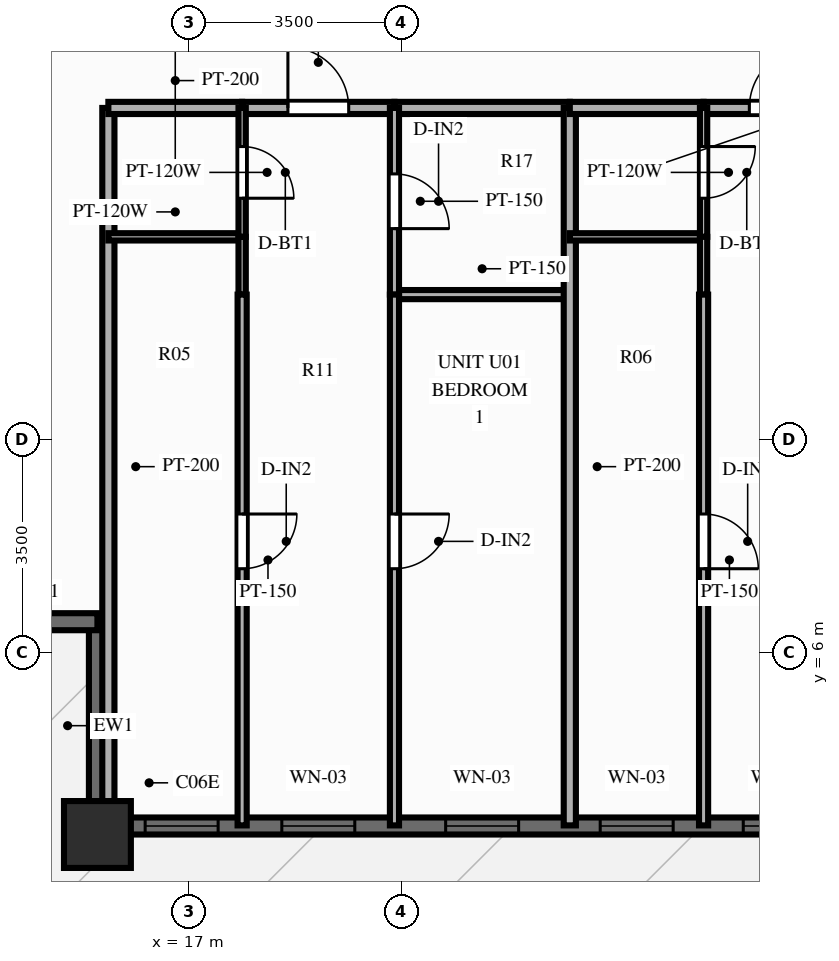
"""IFC4 building model, lengths in metres.
Left out: names, types, materials, properties, quantities, classifications, styles, units other than length and angle.
Written with IfcOpenShell. Run it as: python <this file> out.ifc"""

import sys

from ifc_helpers import new_model, si_unit, direction, frame, frame_2d, origin, origin_2d, place, context, subcontext, project, spatial, rectangle, extrude, source, transform, mapped, element, fill, save


model = new_model("IFC4")
c1 = context("Model", 3, precision=1e-05, world=origin(), true_north=direction((0.0, 1.0)))
c2 = subcontext(c1, "Body", "Model", "MODEL_VIEW")
j1 = project(units=[si_unit("LENGTHUNIT", "METRE"), si_unit("PLANEANGLEUNIT", "RADIAN")], contexts=[c1])
p1 = place(None, origin())
s1 = spatial("IfcSite", under=j1, at=p1, CompositionType="ELEMENT")
p2 = place(p1, origin())
s2 = spatial("IfcBuilding", under=s1, at=p2, CompositionType="ELEMENT")
p3 = place(p2, frame((0.0, 0.0, 19.4)))
s3 = spatial("IfcBuildingStorey", under=s2, at=p3, CompositionType="ELEMENT", Elevation=19.4)
m1 = source(origin(), c2, "Body", "SweptSolid", [
    extrude(rectangle(XDim=1.1, YDim=1.1, at=origin_2d()), origin(), (0.0, 0.0, 1.0), 3.0),
])
p4 = place(p3, frame((15.5, 3.0, 0.0), z_axis=(0.0, 0.0, 1.0), x_axis=(1.0, 0.0, 0.0)))
e1 = element("IfcColumn", 1, at=p4, inside=s3, PredefinedType="COLUMN", context=c2, shape_type="MappedRepresentation", body=[
    mapped(m1, transform((0.0, 0.0, 0.0), scale=1.0)),
])
p5 = place(p3, frame((15.5, 3.14, 0.0), z_axis=(0.0, 0.0, 1.0), x_axis=(1.0, 0.0, 0.0)))
e2 = element("IfcWall", 2, at=p5, inside=s3, PredefinedType="SOLIDWALL", context=c2, shape_type="SweptSolid", body=[
    extrude(rectangle(XDim=45.0, YDim=0.28, at=frame_2d((22.5, 0.0))), origin(), (0.0, 0.0, 1.0), 2.28),
])
p6 = place(p5, frame((0.785, 0.0, 0.25)))
e3 = element("IfcOpeningElement", 3, at=p6, cuts=e2, PredefinedType="OPENING", context=c2, shape_type="SweptSolid", body=[
    extrude(rectangle(XDim=1.2, YDim=1.5, at=frame_2d((0.6, 0.75))), frame((0.0, 0.152, 0.0), z_axis=(0.0, -1.0, 0.0), x_axis=(1.0, 0.0, 0.0)), (0.0, 0.0, 1.0), 0.304),
])
p7 = place(p5, frame((3.033, 0.0, 0.25)))
e4 = element("IfcOpeningElement", 4, at=p7, cuts=e2, PredefinedType="OPENING", context=c2, shape_type="SweptSolid", body=[
    extrude(rectangle(XDim=1.2, YDim=1.5, at=frame_2d((0.6, 0.75))), frame((0.0, 0.152, 0.0), z_axis=(0.0, -1.0, 0.0), x_axis=(1.0, 0.0, 0.0)), (0.0, 0.0, 1.0), 0.304),
])
p8 = place(p5, frame((5.727, 0.0, 0.25)))
e5 = element("IfcOpeningElement", 5, at=p8, cuts=e2, PredefinedType="OPENING", context=c2, shape_type="SweptSolid", body=[
    extrude(rectangle(XDim=1.2, YDim=1.5, at=frame_2d((0.6, 0.75))), frame((0.0, 0.152, 0.0), z_axis=(0.0, -1.0, 0.0), x_axis=(1.0, 0.0, 0.0)), (0.0, 0.0, 1.0), 0.304),
])
p9 = place(p5, frame((8.269, 0.0, 0.25)))
e6 = element("IfcOpeningElement", 6, at=p9, cuts=e2, PredefinedType="OPENING", context=c2, shape_type="SweptSolid", body=[
    extrude(rectangle(XDim=1.2, YDim=1.5, at=frame_2d((0.6, 0.75))), frame((0.0, 0.152, 0.0), z_axis=(0.0, -1.0, 0.0), x_axis=(1.0, 0.0, 0.0)), (0.0, 0.0, 1.0), 0.304),
])
p10 = place(p5, frame((10.621, 0.0, 0.25)))
e7 = element("IfcOpeningElement", 7, at=p10, cuts=e2, PredefinedType="OPENING", context=c2, shape_type="SweptSolid", body=[
    extrude(rectangle(XDim=1.2, YDim=1.5, at=frame_2d((0.6, 0.75))), frame((0.0, 0.152, 0.0), z_axis=(0.0, -1.0, 0.0), x_axis=(1.0, 0.0, 0.0)), (0.0, 0.0, 1.0), 0.304),
])
p11 = place(p5, frame((13.316, 0.0, 0.25)))
e8 = element("IfcOpeningElement", 8, at=p11, cuts=e2, PredefinedType="OPENING", context=c2, shape_type="SweptSolid", body=[
    extrude(rectangle(XDim=1.2, YDim=1.5, at=frame_2d((0.6, 0.75))), frame((0.0, 0.152, 0.0), z_axis=(0.0, -1.0, 0.0), x_axis=(1.0, 0.0, 0.0)), (0.0, 0.0, 1.0), 0.304),
])
p12 = place(p5, frame((16.624, 0.0, 0.25)))
e9 = element("IfcOpeningElement", 9, at=p12, cuts=e2, PredefinedType="OPENING", context=c2, shape_type="SweptSolid", body=[
    extrude(rectangle(XDim=0.7, YDim=1.5, at=frame_2d((0.35, 0.75))), frame((0.0, 0.152, 0.0), z_axis=(0.0, -1.0, 0.0), x_axis=(1.0, 0.0, 0.0)), (0.0, 0.0, 1.0), 0.304),
])
p13 = place(p5, frame((18.141, 0.0, 0.25)))
e10 = element("IfcOpeningElement", 10, at=p13, cuts=e2, PredefinedType="OPENING", context=c2, shape_type="SweptSolid", body=[
    extrude(rectangle(XDim=1.2, YDim=1.5, at=frame_2d((0.6, 0.75))), frame((0.0, 0.152, 0.0), z_axis=(0.0, -1.0, 0.0), x_axis=(1.0, 0.0, 0.0)), (0.0, 0.0, 1.0), 0.304),
])
p14 = place(p5, frame((21.874, 0.0, 0.0), z_axis=(0.0, 0.0, 1.0), x_axis=(-1.0, 0.0, 0.0)))
e11 = element("IfcOpeningElement", 11, at=p14, cuts=e2, PredefinedType="OPENING", context=c2, shape_type="SweptSolid", body=[
    extrude(rectangle(XDim=1.1, YDim=2.15, at=frame_2d((0.55, 1.075))), frame((0.0, 0.152, 0.0), z_axis=(0.0, -1.0, 0.0), x_axis=(1.0, 0.0, 0.0)), (0.0, 0.0, 1.0), 0.304),
])
p15 = place(p5, frame((23.223, 0.0, 0.25)))
e12 = element("IfcOpeningElement", 12, at=p15, cuts=e2, PredefinedType="OPENING", context=c2, shape_type="SweptSolid", body=[
    extrude(rectangle(XDim=1.2, YDim=1.5, at=frame_2d((0.6, 0.75))), frame((0.0, 0.152, 0.0), z_axis=(0.0, -1.0, 0.0), x_axis=(1.0, 0.0, 0.0)), (0.0, 0.0, 1.0), 0.304),
])
p16 = place(p5, frame((25.507, 0.0, 0.25)))
e13 = element("IfcOpeningElement", 13, at=p16, cuts=e2, PredefinedType="OPENING", context=c2, shape_type="SweptSolid", body=[
    extrude(rectangle(XDim=1.2, YDim=1.5, at=frame_2d((0.6, 0.75))), frame((0.0, 0.152, 0.0), z_axis=(0.0, -1.0, 0.0), x_axis=(1.0, 0.0, 0.0)), (0.0, 0.0, 1.0), 0.304),
])
p17 = place(p5, frame((27.6, 0.0, 0.25)))
e14 = element("IfcOpeningElement", 14, at=p17, cuts=e2, PredefinedType="OPENING", context=c2, shape_type="SweptSolid", body=[
    extrude(rectangle(XDim=0.7, YDim=1.5, at=frame_2d((0.35, 0.75))), frame((0.0, 0.152, 0.0), z_axis=(0.0, -1.0, 0.0), x_axis=(1.0, 0.0, 0.0)), (0.0, 0.0, 1.0), 0.304),
])
p18 = place(p5, frame((30.589, 0.0, 0.25)))
e15 = element("IfcOpeningElement", 15, at=p18, cuts=e2, PredefinedType="OPENING", context=c2, shape_type="SweptSolid", body=[
    extrude(rectangle(XDim=1.2, YDim=1.5, at=frame_2d((0.6, 0.75))), frame((0.0, 0.152, 0.0), z_axis=(0.0, -1.0, 0.0), x_axis=(1.0, 0.0, 0.0)), (0.0, 0.0, 1.0), 0.304),
])
p19 = place(p5, frame((32.872, 0.0, 0.25)))
e16 = element("IfcOpeningElement", 16, at=p19, cuts=e2, PredefinedType="OPENING", context=c2, shape_type="SweptSolid", body=[
    extrude(rectangle(XDim=1.2, YDim=1.5, at=frame_2d((0.6, 0.75))), frame((0.0, 0.152, 0.0), z_axis=(0.0, -1.0, 0.0), x_axis=(1.0, 0.0, 0.0)), (0.0, 0.0, 1.0), 0.304),
])
p20 = place(p5, frame((35.455, 0.0, 0.25)))
e17 = element("IfcOpeningElement", 17, at=p20, cuts=e2, PredefinedType="OPENING", context=c2, shape_type="SweptSolid", body=[
    extrude(rectangle(XDim=1.2, YDim=1.5, at=frame_2d((0.6, 0.75))), frame((0.0, 0.152, 0.0), z_axis=(0.0, -1.0, 0.0), x_axis=(1.0, 0.0, 0.0)), (0.0, 0.0, 1.0), 0.304),
])
p21 = place(p5, frame((37.954, 0.0, 0.25)))
e18 = element("IfcOpeningElement", 18, at=p21, cuts=e2, PredefinedType="OPENING", context=c2, shape_type="SweptSolid", body=[
    extrude(rectangle(XDim=1.2, YDim=1.5, at=frame_2d((0.6, 0.75))), frame((0.0, 0.152, 0.0), z_axis=(0.0, -1.0, 0.0), x_axis=(1.0, 0.0, 0.0)), (0.0, 0.0, 1.0), 0.304),
])
p22 = place(p5, frame((40.238, 0.0, 0.25)))
e19 = element("IfcOpeningElement", 19, at=p22, cuts=e2, PredefinedType="OPENING", context=c2, shape_type="SweptSolid", body=[
    extrude(rectangle(XDim=1.2, YDim=1.5, at=frame_2d((0.6, 0.75))), frame((0.0, 0.152, 0.0), z_axis=(0.0, -1.0, 0.0), x_axis=(1.0, 0.0, 0.0)), (0.0, 0.0, 1.0), 0.304),
])
p23 = place(p5, frame((42.716, 0.0, 0.25)))
e20 = element("IfcOpeningElement", 20, at=p23, cuts=e2, PredefinedType="OPENING", context=c2, shape_type="SweptSolid", body=[
    extrude(rectangle(XDim=1.2, YDim=1.5, at=frame_2d((0.6, 0.75))), frame((0.0, 0.152, 0.0), z_axis=(0.0, -1.0, 0.0), x_axis=(1.0, 0.0, 0.0)), (0.0, 0.0, 1.0), 0.304),
])
for number, where, z_axis, x_axis in (
    (21, (15.5, 3.08, 0.0), (0.0, 0.0, 1.0), (0.0, 1.0, 0.0)),
    (22, (12.08, 6.5, 0.0), (0.0, 0.0, 1.0), (1.0, 0.0, 0.0)),
):
    element("IfcWall", number, at=place(p3, frame(where, z_axis=z_axis, x_axis=x_axis)), inside=s3, PredefinedType="SOLIDWALL", context=c2, shape_type="SweptSolid", body=[
        extrude(rectangle(XDim=3.42, YDim=0.28, at=frame_2d((1.71, 0.0))), origin(), (0.0, 0.0, 1.0), 2.28),
    ])
p24 = place(p3, frame((15.68, 14.95, 0.0), z_axis=(0.0, 0.0, 1.0), x_axis=(0.0, -1.0, 0.0)))
e23 = element("IfcWall", 23, at=p24, inside=s3, PredefinedType="PARTITIONING", context=c2, shape_type="SweptSolid", body=[
    extrude(rectangle(XDim=11.8, YDim=0.2, at=frame_2d((5.9, 0.0))), origin(), (0.0, 0.0, 1.0), 2.79),
])
p25 = place(p3, frame((15.68, 14.95, 0.0), z_axis=(0.0, 0.0, 1.0), x_axis=(1.0, 0.0, 0.0)))
e24 = element("IfcWall", 24, at=p25, inside=s3, PredefinedType="PARTITIONING", context=c2, shape_type="SweptSolid", body=[
    extrude(rectangle(XDim=2.2, YDim=0.2, at=frame_2d((1.1, 0.0))), origin(), (0.0, 0.0, 1.0), 2.79),
])
p26 = place(p3, frame((17.88, 14.95, 0.0), z_axis=(0.0, 0.0, 1.0), x_axis=(1.0, 0.0, 0.0)))
e25 = element("IfcWall", 25, at=p26, inside=s3, PredefinedType="PARTITIONING", context=c2, shape_type="SweptSolid", body=[
    extrude(rectangle(XDim=2.505, YDim=0.2, at=frame_2d((1.252, 0.0))), origin(), (0.0, 0.0, 1.0), 2.79),
])
p27 = place(p26, frame((0.753, 0.0, 0.0)))
e26 = element("IfcOpeningElement", 26, at=p27, cuts=e25, PredefinedType="OPENING", context=c2, shape_type="SweptSolid", body=[
    extrude(rectangle(XDim=1.0, YDim=2.15, at=frame_2d((0.5, 1.075))), frame((0.0, 0.112, 0.0), z_axis=(0.0, -1.0, 0.0), x_axis=(1.0, 0.0, 0.0)), (0.0, 0.0, 1.0), 0.224),
])
p28 = place(p3, frame((20.385, 14.95, 0.0), z_axis=(0.0, 0.0, 1.0), x_axis=(1.0, 0.0, 0.0)))
e27 = element("IfcWall", 27, at=p28, inside=s3, PredefinedType="PARTITIONING", context=c2, shape_type="SweptSolid", body=[
    extrude(rectangle(XDim=2.884, YDim=0.2, at=frame_2d((1.442, 0.0))), origin(), (0.0, 0.0, 1.0), 2.79),
])
p29 = place(p3, frame((15.68, 12.83, 0.0), z_axis=(0.0, 0.0, 1.0), x_axis=(1.0, 0.0, 0.0)))
e28 = element("IfcWall", 28, at=p29, inside=s3, PredefinedType="PARTITIONING", context=c2, shape_type="SweptSolid", body=[
    extrude(rectangle(XDim=2.2, YDim=0.12, at=frame_2d((1.1, 0.0))), origin(), (0.0, 0.0, 1.0), 2.79),
])
p30 = place(p3, frame((20.385, 11.88, 0.0), z_axis=(0.0, 0.0, 1.0), x_axis=(1.0, 0.0, 0.0)))
e29 = element("IfcWall", 29, at=p30, inside=s3, PredefinedType="PARTITIONING", context=c2, shape_type="SweptSolid", body=[
    extrude(rectangle(XDim=2.884, YDim=0.15, at=frame_2d((1.442, 0.0))), origin(), (0.0, 0.0, 1.0), 2.79),
])
p31 = place(p3, frame((17.88, 14.95, 0.0), z_axis=(0.0, 0.0, 1.0), x_axis=(0.0, -1.0, 0.0)))
e30 = element("IfcWall", 30, at=p31, inside=s3, PredefinedType="PARTITIONING", context=c2, shape_type="SweptSolid", body=[
    extrude(rectangle(XDim=2.12, YDim=0.12, at=frame_2d((1.06, 0.0))), origin(), (0.0, 0.0, 1.0), 2.79),
])
p32 = place(p31, frame((0.635, 0.0, 0.0)))
e31 = element("IfcOpeningElement", 31, at=p32, cuts=e30, PredefinedType="OPENING", context=c2, shape_type="SweptSolid", body=[
    extrude(rectangle(XDim=0.85, YDim=2.05, at=frame_2d((0.425, 1.025))), frame((0.0, 0.072, 0.0), z_axis=(0.0, -1.0, 0.0), x_axis=(1.0, 0.0, 0.0)), (0.0, 0.0, 1.0), 0.144),
])
p33 = place(p3, frame((17.88, 12.83, 0.0), z_axis=(0.0, 0.0, 1.0), x_axis=(0.0, -1.0, 0.0)))
e32 = element("IfcWall", 32, at=p33, inside=s3, PredefinedType="PARTITIONING", context=c2, shape_type="SweptSolid", body=[
    extrude(rectangle(XDim=0.95, YDim=0.12, at=frame_2d((0.475, 0.0))), origin(), (0.0, 0.0, 1.0), 2.79),
])
p34 = place(p3, frame((17.88, 11.88, 0.0), z_axis=(0.0, 0.0, 1.0), x_axis=(0.0, -1.0, 0.0)))
e33 = element("IfcWall", 33, at=p34, inside=s3, PredefinedType="PARTITIONING", context=c2, shape_type="SweptSolid", body=[
    extrude(rectangle(XDim=8.73, YDim=0.15, at=frame_2d((4.365, 0.0))), origin(), (0.0, 0.0, 1.0), 2.79),
])
p35 = place(p34, frame((3.609, 0.0, 0.0)))
e34 = element("IfcOpeningElement", 34, at=p35, cuts=e33, PredefinedType="OPENING", context=c2, shape_type="SweptSolid", body=[
    extrude(rectangle(XDim=0.9, YDim=2.1, at=frame_2d((0.45, 1.05))), frame((0.0, 0.087, 0.0), z_axis=(0.0, -1.0, 0.0), x_axis=(1.0, 0.0, 0.0)), (0.0, 0.0, 1.0), 0.174),
])
p36 = place(p3, frame((20.385, 14.95, 0.0), z_axis=(0.0, 0.0, 1.0), x_axis=(0.0, -1.0, 0.0)))
e35 = element("IfcWall", 35, at=p36, inside=s3, PredefinedType="PARTITIONING", context=c2, shape_type="SweptSolid", body=[
    extrude(rectangle(XDim=3.07, YDim=0.15, at=frame_2d((1.535, 0.0))), origin(), (0.0, 0.0, 1.0), 2.79),
])
p37 = place(p36, frame((1.085, 0.0, 0.0)))
e36 = element("IfcOpeningElement", 36, at=p37, cuts=e35, PredefinedType="OPENING", context=c2, shape_type="SweptSolid", body=[
    extrude(rectangle(XDim=0.9, YDim=2.1, at=frame_2d((0.45, 1.05))), frame((0.0, 0.087, 0.0), z_axis=(0.0, -1.0, 0.0), x_axis=(1.0, 0.0, 0.0)), (0.0, 0.0, 1.0), 0.174),
])
p38 = place(p3, frame((20.385, 11.88, 0.0), z_axis=(0.0, 0.0, 1.0), x_axis=(0.0, -1.0, 0.0)))
e37 = element("IfcWall", 37, at=p38, inside=s3, PredefinedType="PARTITIONING", context=c2, shape_type="SweptSolid", body=[
    extrude(rectangle(XDim=8.73, YDim=0.15, at=frame_2d((4.365, 0.0))), origin(), (0.0, 0.0, 1.0), 2.79),
])
p39 = place(p38, frame((3.609, 0.0, 0.0)))
e38 = element("IfcOpeningElement", 38, at=p39, cuts=e37, PredefinedType="OPENING", context=c2, shape_type="SweptSolid", body=[
    extrude(rectangle(XDim=0.9, YDim=2.1, at=frame_2d((0.45, 1.05))), frame((0.0, 0.087, 0.0), z_axis=(0.0, -1.0, 0.0), x_axis=(1.0, 0.0, 0.0)), (0.0, 0.0, 1.0), 0.174),
])
p40 = place(p3, frame((23.269, 14.95, 0.0), z_axis=(0.0, 0.0, 1.0), x_axis=(0.0, -1.0, 0.0)))
e39 = element("IfcWall", 39, at=p40, inside=s3, PredefinedType="PARTITIONING", context=c2, shape_type="SweptSolid", body=[
    extrude(rectangle(XDim=11.8, YDim=0.2, at=frame_2d((5.9, 0.0))), origin(), (0.0, 0.0, 1.0), 2.79),
])
p41 = place(p3, frame((23.269, 14.95, 0.0), z_axis=(0.0, 0.0, 1.0), x_axis=(1.0, 0.0, 0.0)))
e40 = element("IfcWall", 40, at=p41, inside=s3, PredefinedType="PARTITIONING", context=c2, shape_type="SweptSolid", body=[
    extrude(rectangle(XDim=2.2, YDim=0.2, at=frame_2d((1.1, 0.0))), origin(), (0.0, 0.0, 1.0), 2.79),
])
p42 = place(p3, frame((25.469, 14.95, 0.0), z_axis=(0.0, 0.0, 1.0), x_axis=(1.0, 0.0, 0.0)))
e41 = element("IfcWall", 41, at=p42, inside=s3, PredefinedType="PARTITIONING", context=c2, shape_type="SweptSolid", body=[
    extrude(rectangle(XDim=2.505, YDim=0.2, at=frame_2d((1.252, 0.0))), origin(), (0.0, 0.0, 1.0), 2.79),
])
p43 = place(p42, frame((0.752, 0.0, 0.0)))
e42 = element("IfcOpeningElement", 42, at=p43, cuts=e41, PredefinedType="OPENING", context=c2, shape_type="SweptSolid", body=[
    extrude(rectangle(XDim=1.0, YDim=2.15, at=frame_2d((0.5, 1.075))), frame((0.0, 0.112, 0.0), z_axis=(0.0, -1.0, 0.0), x_axis=(1.0, 0.0, 0.0)), (0.0, 0.0, 1.0), 0.224),
])
p44 = place(p3, frame((23.269, 12.83, 0.0), z_axis=(0.0, 0.0, 1.0), x_axis=(1.0, 0.0, 0.0)))
e43 = element("IfcWall", 43, at=p44, inside=s3, PredefinedType="PARTITIONING", context=c2, shape_type="SweptSolid", body=[
    extrude(rectangle(XDim=2.2, YDim=0.12, at=frame_2d((1.1, 0.0))), origin(), (0.0, 0.0, 1.0), 2.79),
])
p45 = place(p3, frame((25.469, 14.95, 0.0), z_axis=(0.0, 0.0, 1.0), x_axis=(0.0, -1.0, 0.0)))
e44 = element("IfcWall", 44, at=p45, inside=s3, PredefinedType="PARTITIONING", context=c2, shape_type="SweptSolid", body=[
    extrude(rectangle(XDim=2.12, YDim=0.12, at=frame_2d((1.06, 0.0))), origin(), (0.0, 0.0, 1.0), 2.79),
])
p46 = place(p45, frame((0.635, 0.0, 0.0)))
e45 = element("IfcOpeningElement", 45, at=p46, cuts=e44, PredefinedType="OPENING", context=c2, shape_type="SweptSolid", body=[
    extrude(rectangle(XDim=0.85, YDim=2.05, at=frame_2d((0.425, 1.025))), frame((0.0, 0.072, 0.0), z_axis=(0.0, -1.0, 0.0), x_axis=(1.0, 0.0, 0.0)), (0.0, 0.0, 1.0), 0.144),
])
p47 = place(p3, frame((25.469, 12.83, 0.0), z_axis=(0.0, 0.0, 1.0), x_axis=(0.0, -1.0, 0.0)))
e46 = element("IfcWall", 46, at=p47, inside=s3, PredefinedType="PARTITIONING", context=c2, shape_type="SweptSolid", body=[
    extrude(rectangle(XDim=0.95, YDim=0.12, at=frame_2d((0.475, 0.0))), origin(), (0.0, 0.0, 1.0), 2.79),
])
p48 = place(p3, frame((25.469, 11.88, 0.0), z_axis=(0.0, 0.0, 1.0), x_axis=(0.0, -1.0, 0.0)))
e47 = element("IfcWall", 47, at=p48, inside=s3, PredefinedType="PARTITIONING", context=c2, shape_type="SweptSolid", body=[
    extrude(rectangle(XDim=8.73, YDim=0.15, at=frame_2d((4.365, 0.0))), origin(), (0.0, 0.0, 1.0), 2.79),
])
p49 = place(p48, frame((3.609, 0.0, 0.0)))
e48 = element("IfcOpeningElement", 48, at=p49, cuts=e47, PredefinedType="OPENING", context=c2, shape_type="SweptSolid", body=[
    extrude(rectangle(XDim=0.9, YDim=2.1, at=frame_2d((0.45, 1.05))), frame((0.0, 0.087, 0.0), z_axis=(0.0, -1.0, 0.0), x_axis=(1.0, 0.0, 0.0)), (0.0, 0.0, 1.0), 0.174),
])
m2 = source(origin(), c2, "Body", "SweptSolid", [
    extrude(rectangle(XDim=1.2, YDim=1.5, at=frame_2d((0.6, 0.75))), frame((0.0, 0.03, 0.0), z_axis=(0.0, -1.0, 0.0), x_axis=(1.0, 0.0, 0.0)), (0.0, 0.0, 1.0), 0.06),
])
p50 = place(p6, origin())
e49 = element("IfcWindow", 49, at=p50, inside=s3, PartitioningType="SINGLE_PANEL", PredefinedType="WINDOW", context=c2, shape_type="MappedRepresentation", body=[
    mapped(m2, transform((0.0, 0.0, 0.0), scale=1.0)),
])
fill(e3, e49)
p51 = place(p7, origin())
e50 = element("IfcWindow", 50, at=p51, inside=s3, PartitioningType="SINGLE_PANEL", PredefinedType="WINDOW", context=c2, shape_type="MappedRepresentation", body=[
    mapped(m2, transform((0.0, 0.0, 0.0), scale=1.0)),
])
fill(e4, e50)
p52 = place(p8, origin())
e51 = element("IfcWindow", 51, at=p52, inside=s3, PartitioningType="SINGLE_PANEL", PredefinedType="WINDOW", context=c2, shape_type="MappedRepresentation", body=[
    mapped(m2, transform((0.0, 0.0, 0.0), scale=1.0)),
])
fill(e5, e51)
p53 = place(p9, origin())
e52 = element("IfcWindow", 52, at=p53, inside=s3, PartitioningType="SINGLE_PANEL", PredefinedType="WINDOW", context=c2, shape_type="MappedRepresentation", body=[
    mapped(m2, transform((0.0, 0.0, 0.0), scale=1.0)),
])
fill(e6, e52)
p54 = place(p10, origin())
e53 = element("IfcWindow", 53, at=p54, inside=s3, PartitioningType="SINGLE_PANEL", PredefinedType="WINDOW", context=c2, shape_type="MappedRepresentation", body=[
    mapped(m2, transform((0.0, 0.0, 0.0), scale=1.0)),
])
fill(e7, e53)
m3 = source(origin(), c2, "Body", "SweptSolid", [
    extrude(rectangle(XDim=1.0, YDim=2.15, at=frame_2d((0.5, 1.075))), frame((0.0, 0.025, 0.0), z_axis=(0.0, -1.0, 0.0), x_axis=(1.0, 0.0, 0.0)), (0.0, 0.0, 1.0), 0.05),
])
p55 = place(p27, origin())
e54 = element("IfcDoor", 54, at=p55, inside=s3, OperationType="SINGLE_SWING_LEFT", PredefinedType="DOOR", context=c2, shape_type="MappedRepresentation", body=[
    mapped(m3, transform((0.0, 0.0, 0.0), scale=1.0)),
])
fill(e26, e54)
m4 = source(origin(), c2, "Body", "SweptSolid", [
    extrude(rectangle(XDim=0.85, YDim=2.05, at=frame_2d((0.425, 1.025))), frame((0.0, 0.025, 0.0), z_axis=(0.0, -1.0, 0.0), x_axis=(1.0, 0.0, 0.0)), (0.0, 0.0, 1.0), 0.05),
])
p56 = place(p32, origin())
e55 = element("IfcDoor", 55, at=p56, inside=s3, OperationType="SINGLE_SWING_RIGHT", PredefinedType="DOOR", context=c2, shape_type="MappedRepresentation", body=[
    mapped(m4, transform((0.0, 0.0, 0.0), scale=1.0)),
])
fill(e31, e55)
m5 = source(origin(), c2, "Body", "SweptSolid", [
    extrude(rectangle(XDim=0.9, YDim=2.1, at=frame_2d((0.45, 1.05))), frame((0.0, 0.025, 0.0), z_axis=(0.0, -1.0, 0.0), x_axis=(1.0, 0.0, 0.0)), (0.0, 0.0, 1.0), 0.05),
])
p57 = place(p35, origin())
e56 = element("IfcDoor", 56, at=p57, inside=s3, OperationType="SINGLE_SWING_LEFT", PredefinedType="DOOR", context=c2, shape_type="MappedRepresentation", body=[
    mapped(m5, transform((0.0, 0.0, 0.0), scale=1.0)),
])
fill(e34, e56)
p58 = place(p37, origin())
e57 = element("IfcDoor", 57, at=p58, inside=s3, OperationType="SINGLE_SWING_RIGHT", PredefinedType="DOOR", context=c2, shape_type="MappedRepresentation", body=[
    mapped(m5, transform((0.0, 0.0, 0.0), scale=1.0)),
])
fill(e36, e57)
p59 = place(p39, origin())
e58 = element("IfcDoor", 58, at=p59, inside=s3, OperationType="SINGLE_SWING_LEFT", PredefinedType="DOOR", context=c2, shape_type="MappedRepresentation", body=[
    mapped(m5, transform((0.0, 0.0, 0.0), scale=1.0)),
])
fill(e38, e58)
p60 = place(p43, origin())
e59 = element("IfcDoor", 59, at=p60, inside=s3, OperationType="SINGLE_SWING_RIGHT", PredefinedType="DOOR", context=c2, shape_type="MappedRepresentation", body=[
    mapped(m3, transform((0.0, 0.0, 0.0), scale=1.0)),
])
fill(e42, e59)
p61 = place(p46, origin())
e60 = element("IfcDoor", 60, at=p61, inside=s3, OperationType="SINGLE_SWING_LEFT", PredefinedType="DOOR", context=c2, shape_type="MappedRepresentation", body=[
    mapped(m4, transform((0.0, 0.0, 0.0), scale=1.0)),
])
fill(e45, e60)
p62 = place(p49, origin())
e61 = element("IfcDoor", 61, at=p62, inside=s3, OperationType="SINGLE_SWING_RIGHT", PredefinedType="DOOR", context=c2, shape_type="MappedRepresentation", body=[
    mapped(m5, transform((0.0, 0.0, 0.0), scale=1.0)),
])
fill(e48, e61)
save(model, sys.argv[1])
